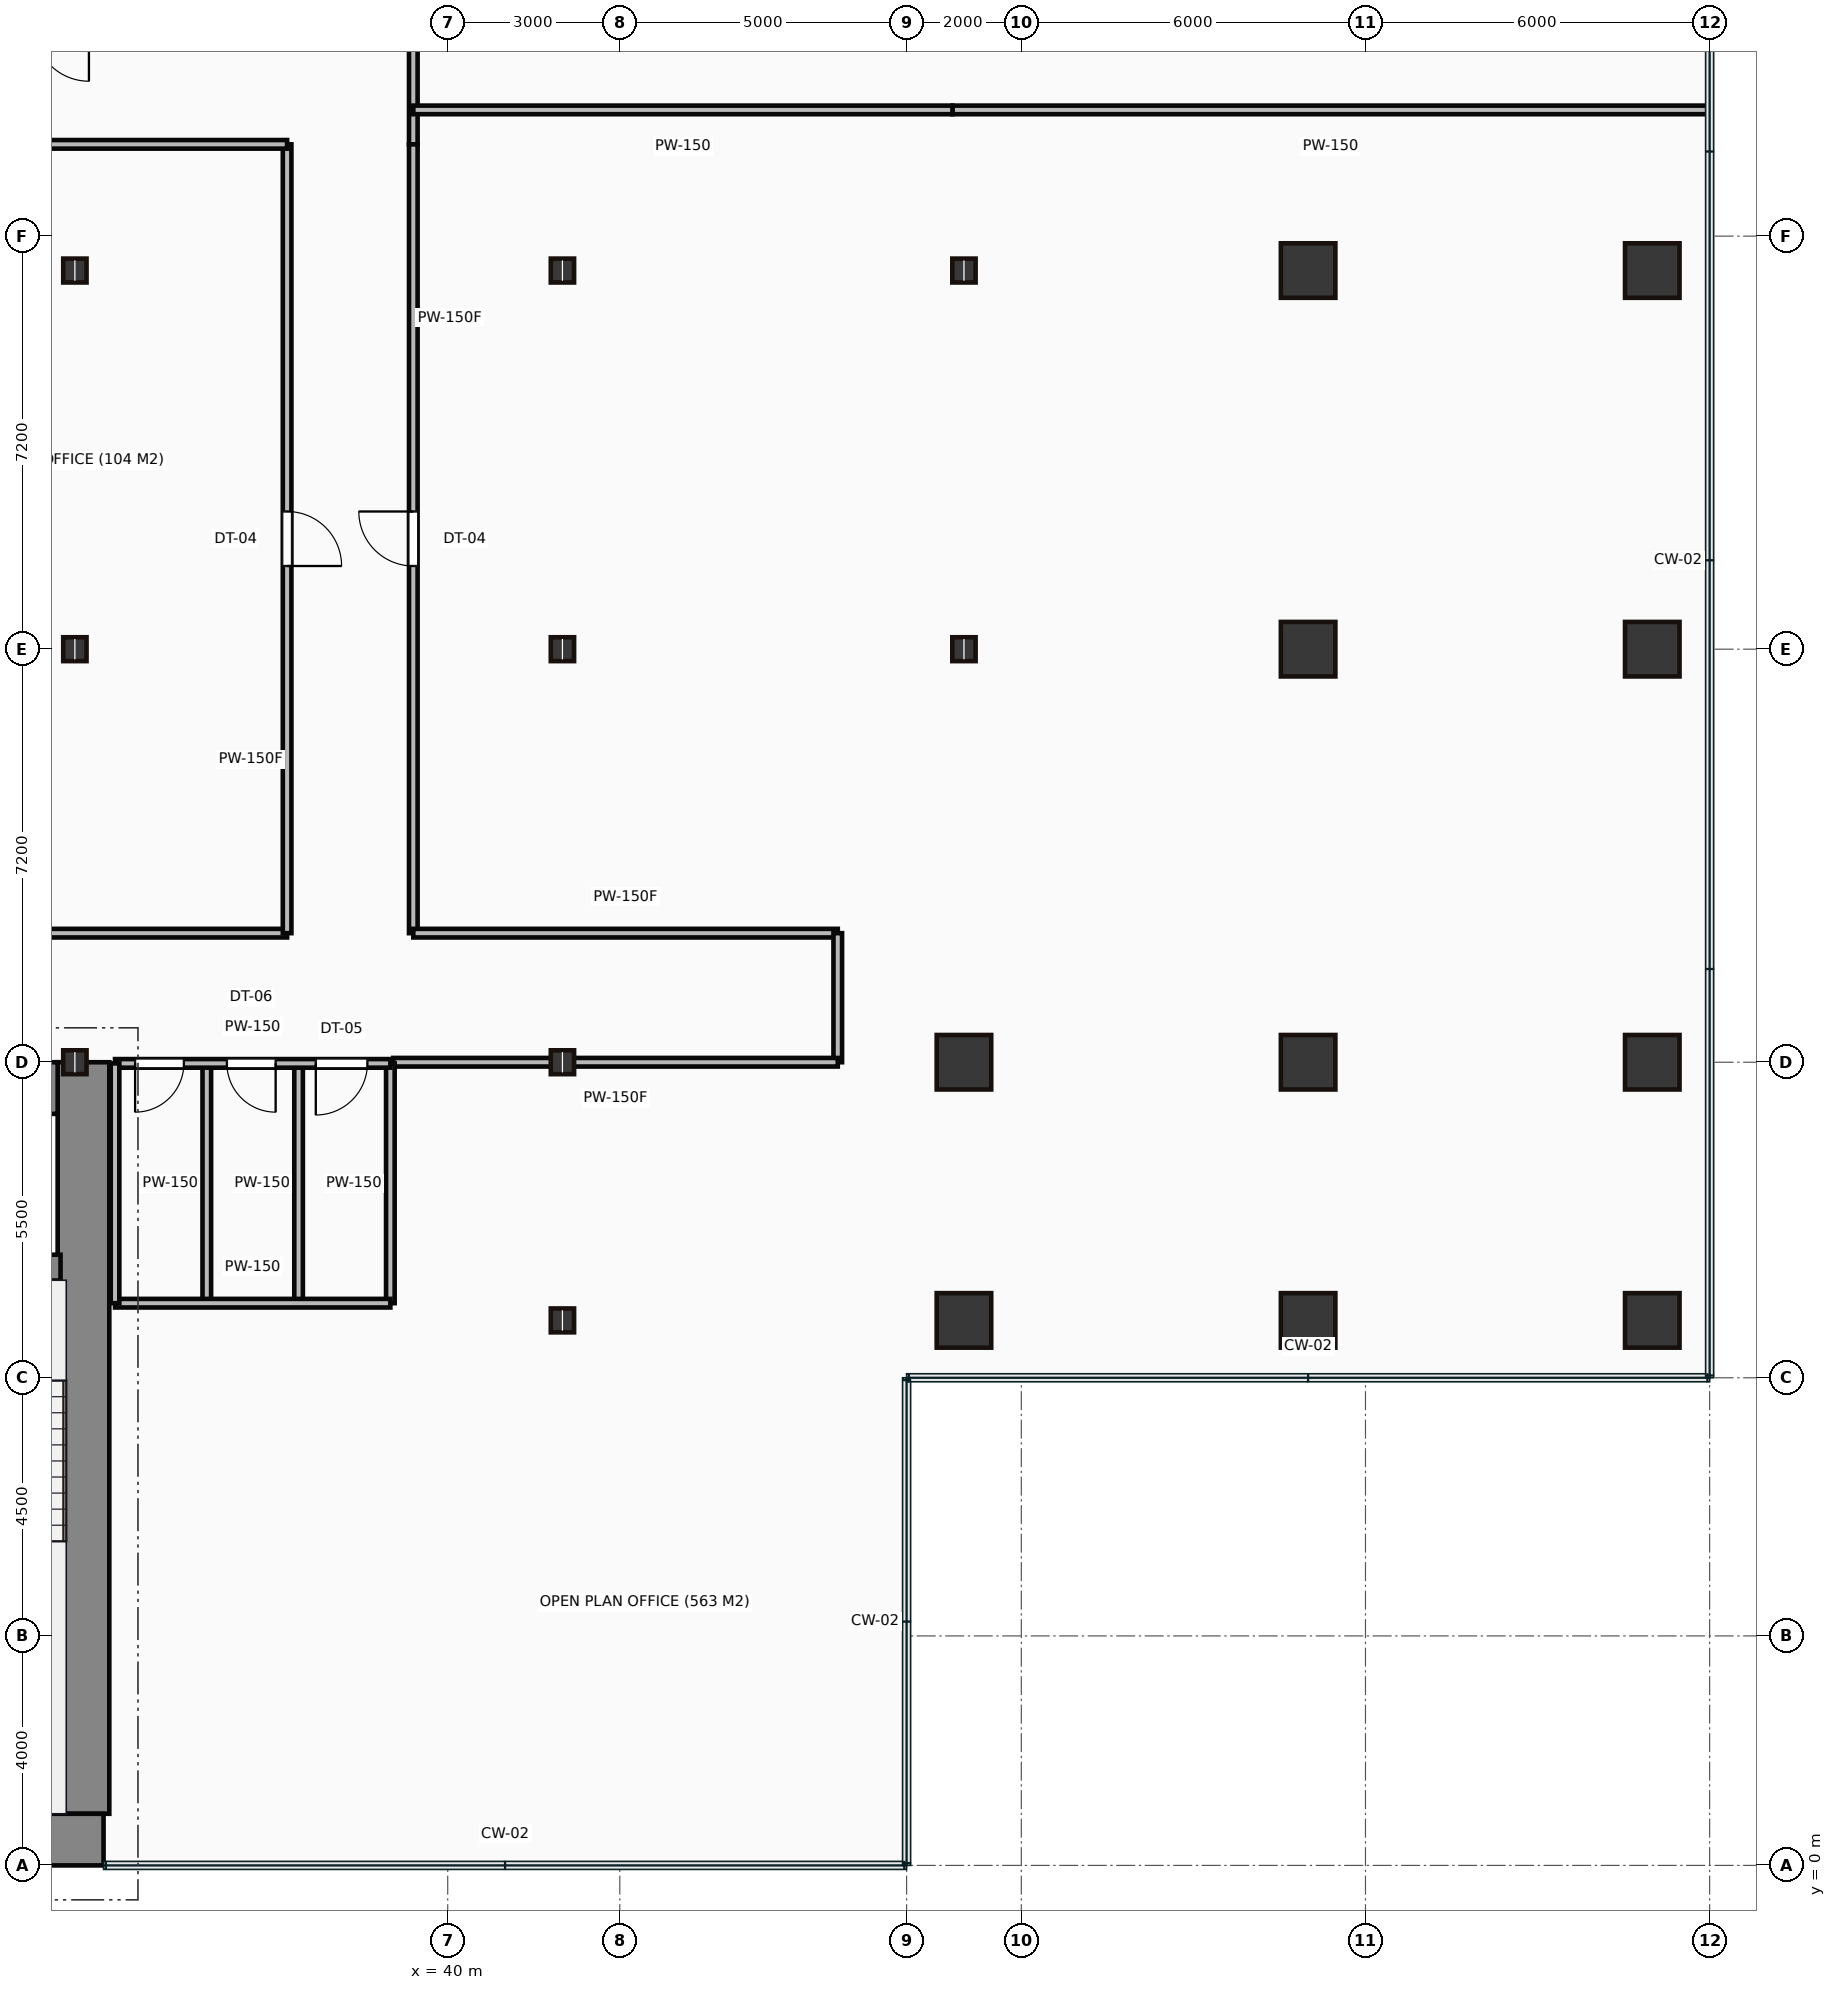
"""IFC4 building model, lengths in metres.
Left out: names, types, materials, properties, quantities, classifications, styles, units other than length and angle.
Written with IfcOpenShell. Run it as: python <this file> out.ifc"""

import sys

from ifc_helpers import new_model, si_unit, direction, frame, frame_2d, origin, origin_2d, place, context, subcontext, project, spatial, rectangle, hollow_rectangle, i_section, extrude, source, transform, mapped, element, fill, save


model = new_model("IFC4")
c1 = context("Model", 3, precision=1e-05, world=origin(), true_north=direction((0.0, 1.0)))
c2 = subcontext(c1, "Body", "Model", "MODEL_VIEW")
j1 = project(units=[si_unit("LENGTHUNIT", "METRE"), si_unit("PLANEANGLEUNIT", "RADIAN")], contexts=[c1])
p1 = place(None, origin())
s1 = spatial("IfcSite", under=j1, at=p1, CompositionType="ELEMENT")
p2 = place(p1, origin())
s2 = spatial("IfcBuilding", under=s1, at=p2, CompositionType="ELEMENT")
p3 = place(p2, frame((0.0, 0.0, 47.1)))
s3 = spatial("IfcBuildingStorey", under=s2, at=p3, CompositionType="ELEMENT", Elevation=47.1)
m1 = source(origin(), c2, "Body", "SweptSolid", [
    extrude(rectangle(XDim=29.5, YDim=0.9, at=frame_2d((14.75, 0.0))), origin(), (0.0, 0.0, 1.0), 3.65),
])
p4 = place(p3, frame((4.5, 0.45, 0.0), z_axis=(0.0, 0.0, 1.0), x_axis=(1.0, 0.0, 0.0)))
e1 = element("IfcWall", 1, at=p4, inside=s3, PredefinedType="SHEAR", context=c2, shape_type="MappedRepresentation", body=[
    mapped(m1, transform((0.0, 0.0, 0.0))),
])
m2 = source(origin(), c2, "Body", "SweptSolid", [
    extrude(rectangle(XDim=13.1, YDim=0.9, at=frame_2d((6.55, 0.0))), origin(), (0.0, 0.0, 1.0), 3.65),
])
p5 = place(p3, frame((33.65, 0.9, 0.0), z_axis=(0.0, 0.0, 1.0), x_axis=(0.0, 1.0, 0.0)))
e2 = element("IfcWall", 2, at=p5, inside=s3, PredefinedType="SHEAR", context=c2, shape_type="MappedRepresentation", body=[
    mapped(m2, transform((0.0, 0.0, 0.0))),
])
m3 = source(origin(), c2, "Body", "SweptSolid", [
    extrude(rectangle(XDim=12.6, YDim=0.9, at=frame_2d((6.3, 0.0))), origin(), (0.0, 0.0, 1.0), 3.65),
])
p6 = place(p3, frame((20.6, 13.55, 0.0), z_axis=(0.0, 0.0, 1.0), x_axis=(1.0, 0.0, 0.0)))
e3 = element("IfcWall", 3, at=p6, inside=s3, PredefinedType="SHEAR", context=c2, shape_type="MappedRepresentation", body=[
    mapped(m3, transform((0.0, 0.0, 0.0))),
])
p7 = place(p6, frame((9.25, 0.0, 0.0)))
e4 = element("IfcOpeningElement", 4, at=p7, cuts=e3, PredefinedType="OPENING", context=c2, shape_type="SweptSolid", body=[
    extrude(rectangle(XDim=1.1, YDim=2.15, at=frame_2d((0.55, 1.075))), frame((0.0, 0.46, 0.0), z_axis=(0.0, -1.0, 0.0), x_axis=(1.0, 0.0, 0.0)), (0.0, 0.0, 1.0), 0.92),
])
m4 = source(origin(), c2, "Body", "SweptSolid", [
    extrude(rectangle(XDim=3.39, YDim=0.45, at=frame_2d((1.695, 0.0))), origin(), (0.0, 0.0, 1.0), 3.65),
])
p8 = place(p3, frame((29.86, 10.42, 0.0), z_axis=(0.0, 0.0, 1.0), x_axis=(1.0, 0.0, 0.0)))
e5 = element("IfcWall", 5, at=p8, inside=s3, PredefinedType="SHEAR", context=c2, shape_type="MappedRepresentation", body=[
    mapped(m4, transform((0.0, 0.0, 0.0))),
])
p9 = place(p8, frame((1.1, 0.0, 0.0)))
e6 = element("IfcOpeningElement", 6, at=p9, cuts=e5, PredefinedType="OPENING", context=c2, shape_type="SweptSolid", body=[
    extrude(rectangle(XDim=1.1, YDim=2.15, at=frame_2d((0.55, 1.075))), frame((0.0, 0.235, 0.0), z_axis=(0.0, -1.0, 0.0), x_axis=(1.0, 0.0, 0.0)), (0.0, 0.0, 1.0), 0.47),
])
m5 = source(origin(), c2, "Body", "SweptSolid", [
    extrude(i_section(OverallWidth=0.406, OverallDepth=0.416, WebThickness=0.03, FlangeThickness=0.048, at=origin_2d()), origin(), (0.0, 0.0, 1.0), 3.65),
])
for number, where, z_axis, x_axis in (
    (7, (33.5, 14.0, 0.0), (0.0, 0.0, 1.0), (1.0, 0.0, 0.0)),
    (8, (33.5, 21.2, 0.0), (0.0, 0.0, 1.0), (1.0, 0.0, 0.0)),
    (9, (33.5, 27.8, 0.0), (0.0, 0.0, 1.0), (1.0, 0.0, 0.0)),
    (10, (42.0, 9.5, 0.0), (0.0, 0.0, 1.0), (1.0, 0.0, 0.0)),
    (11, (42.0, 14.0, 0.0), (0.0, 0.0, 1.0), (1.0, 0.0, 0.0)),
    (12, (42.0, 21.2, 0.0), (0.0, 0.0, 1.0), (1.0, 0.0, 0.0)),
    (13, (42.0, 27.8, 0.0), (0.0, 0.0, 1.0), (1.0, 0.0, 0.0)),
):
    element("IfcColumn", number, at=place(p3, frame(where, z_axis=z_axis, x_axis=x_axis)), inside=s3, PredefinedType="COLUMN", context=c2, shape_type="MappedRepresentation", body=[
        mapped(m5, transform((0.0, 0.0, 0.0))),
    ])
m6 = source(origin(), c2, "Body", "SweptSolid", [
    extrude(hollow_rectangle(XDim=0.95, YDim=0.95, WallThickness=0.045, at=origin_2d()), origin(), (0.0, 0.0, 1.0), 3.65),
])
for number, where, z_axis, x_axis in (
    (14, (49.0, 9.5, 0.0), (0.0, 0.0, 1.0), (1.0, 0.0, 0.0)),
    (15, (49.0, 14.0, 0.0), (0.0, 0.0, 1.0), (1.0, 0.0, 0.0)),
):
    element("IfcColumn", number, at=place(p3, frame(where, z_axis=z_axis, x_axis=x_axis)), inside=s3, PredefinedType="COLUMN", context=c2, shape_type="MappedRepresentation", body=[
        mapped(m6, transform((0.0, 0.0, 0.0))),
    ])
for number, where, z_axis, x_axis in (
    (16, (49.0, 21.2, 0.0), (0.0, 0.0, 1.0), (1.0, 0.0, 0.0)),
    (17, (49.0, 27.8, 0.0), (0.0, 0.0, 1.0), (1.0, 0.0, 0.0)),
):
    element("IfcColumn", number, at=place(p3, frame(where, z_axis=z_axis, x_axis=x_axis)), inside=s3, PredefinedType="COLUMN", context=c2, shape_type="MappedRepresentation", body=[
        mapped(m5, transform((0.0, 0.0, 0.0))),
    ])
for number, where, z_axis, x_axis in (
    (18, (55.0, 9.5, 0.0), (0.0, 0.0, 1.0), (1.0, 0.0, 0.0)),
    (19, (55.0, 14.0, 0.0), (0.0, 0.0, 1.0), (1.0, 0.0, 0.0)),
    (20, (55.0, 21.2, 0.0), (0.0, 0.0, 1.0), (1.0, 0.0, 0.0)),
    (21, (55.0, 27.8, 0.0), (0.0, 0.0, 1.0), (1.0, 0.0, 0.0)),
    (22, (61.0, 9.5, 0.0), (0.0, 0.0, 1.0), (1.0, 0.0, 0.0)),
    (23, (61.0, 14.0, 0.0), (0.0, 0.0, 1.0), (1.0, 0.0, 0.0)),
    (24, (61.0, 21.2, 0.0), (0.0, 0.0, 1.0), (1.0, 0.0, 0.0)),
    (25, (61.0, 27.8, 0.0), (0.0, 0.0, 1.0), (1.0, 0.0, 0.0)),
):
    element("IfcColumn", number, at=place(p3, frame(where, z_axis=z_axis, x_axis=x_axis)), inside=s3, PredefinedType="COLUMN", context=c2, shape_type="MappedRepresentation", body=[
        mapped(m6, transform((0.0, 0.0, 0.0))),
    ])
m7 = source(origin(), c2, "Body", "SweptSolid", [
    extrude(rectangle(XDim=4.8, YDim=0.15, at=frame_2d((2.4, 0.0))), origin(), (0.0, 0.0, 1.0), 2.625),
])
p10 = place(p3, frame((34.2, 13.98, 0.0), z_axis=(0.0, 0.0, 1.0), x_axis=(1.0, 0.0, 0.0)))
e26 = element("IfcWall", 26, at=p10, inside=s3, PredefinedType="PARTITIONING", context=c2, shape_type="MappedRepresentation", body=[
    mapped(m7, transform((0.0, 0.0, 0.0))),
])
p11 = place(p10, frame((0.35, 0.0, 0.0)))
e27 = element("IfcOpeningElement", 27, at=p11, cuts=e26, PredefinedType="OPENING", context=c2, shape_type="SweptSolid", body=[
    extrude(rectangle(XDim=0.85, YDim=2.1, at=frame_2d((0.425, 1.05))), frame((0.0, 0.085, 0.0), z_axis=(0.0, -1.0, 0.0), x_axis=(1.0, 0.0, 0.0)), (0.0, 0.0, 1.0), 0.17),
])
p12 = place(p10, frame((1.95, 0.0, 0.0)))
e28 = element("IfcOpeningElement", 28, at=p12, cuts=e26, PredefinedType="OPENING", context=c2, shape_type="SweptSolid", body=[
    extrude(rectangle(XDim=0.85, YDim=2.1, at=frame_2d((0.425, 1.05))), frame((0.0, 0.085, 0.0), z_axis=(0.0, -1.0, 0.0), x_axis=(1.0, 0.0, 0.0)), (0.0, 0.0, 1.0), 0.17),
])
p13 = place(p10, frame((3.5, 0.0, 0.0)))
e29 = element("IfcOpeningElement", 29, at=p13, cuts=e26, PredefinedType="OPENING", context=c2, shape_type="SweptSolid", body=[
    extrude(rectangle(XDim=0.9, YDim=2.1, at=frame_2d((0.45, 1.05))), frame((0.0, 0.085, 0.0), z_axis=(0.0, -1.0, 0.0), x_axis=(1.0, 0.0, 0.0)), (0.0, 0.0, 1.0), 0.17),
])
m8 = source(origin(), c2, "Body", "SweptSolid", [
    extrude(rectangle(XDim=4.8, YDim=0.15, at=frame_2d((2.4, 0.0))), origin(), (0.0, 0.0, 1.0), 3.4),
])
p14 = place(p3, frame((34.2, 9.8, 0.0), z_axis=(0.0, 0.0, 1.0), x_axis=(1.0, 0.0, 0.0)))
e30 = element("IfcWall", 30, at=p14, inside=s3, PredefinedType="PARTITIONING", context=c2, shape_type="MappedRepresentation", body=[
    mapped(m8, transform((0.0, 0.0, 0.0))),
])
m9 = source(origin(), c2, "Body", "SweptSolid", [
    extrude(rectangle(XDim=4.18, YDim=0.15, at=frame_2d((2.09, 0.0))), origin(), (0.0, 0.0, 1.0), 3.4),
])
for number, where, z_axis, x_axis in (
    (31, (39.0, 9.8, 0.0), (0.0, 0.0, 1.0), (0.0, 1.0, 0.0)),
    (32, (34.2, 9.8, 0.0), (0.0, 0.0, 1.0), (0.0, 1.0, 0.0)),
    (33, (35.8, 9.8, 0.0), (0.0, 0.0, 1.0), (0.0, 1.0, 0.0)),
    (34, (37.4, 9.8, 0.0), (0.0, 0.0, 1.0), (0.0, 1.0, 0.0)),
):
    element("IfcWall", number, at=place(p3, frame(where, z_axis=z_axis, x_axis=x_axis)), inside=s3, PredefinedType="PARTITIONING", context=c2, shape_type="MappedRepresentation", body=[
        mapped(m9, transform((0.0, 0.0, 0.0))),
    ])
m10 = source(origin(), c2, "Body", "SweptSolid", [
    extrude(rectangle(XDim=2.05, YDim=0.15, at=frame_2d((1.025, 0.0))), origin(), (0.0, 0.0, 1.0), 3.4),
])
p15 = place(p3, frame((39.4, 32.05, 0.0), z_axis=(0.0, 0.0, 1.0), x_axis=(0.0, -1.0, 0.0)))
e35 = element("IfcWall", 35, at=p15, inside=s3, PredefinedType="PARTITIONING", context=c2, shape_type="MappedRepresentation", body=[
    mapped(m10, transform((0.0, 0.0, 0.0))),
])
m11 = source(origin(), c2, "Body", "SweptSolid", [
    extrude(rectangle(XDim=13.75, YDim=0.15, at=frame_2d((6.875, 0.0))), origin(), (0.0, 0.0, 1.0), 3.4),
])
p16 = place(p3, frame((39.4, 30.0, 0.0), z_axis=(0.0, 0.0, 1.0), x_axis=(0.0, -1.0, 0.0)))
e36 = element("IfcWall", 36, at=p16, inside=s3, PredefinedType="PARTITIONING", context=c2, shape_type="MappedRepresentation", body=[
    mapped(m11, transform((0.0, 0.0, 0.0))),
])
p17 = place(p16, frame((6.4, 0.0, 0.0)))
e37 = element("IfcOpeningElement", 37, at=p17, cuts=e36, PredefinedType="OPENING", context=c2, shape_type="SweptSolid", body=[
    extrude(rectangle(XDim=0.95, YDim=2.15, at=frame_2d((0.475, 1.075))), frame((0.0, 0.085, 0.0), z_axis=(0.0, -1.0, 0.0), x_axis=(1.0, 0.0, 0.0)), (0.0, 0.0, 1.0), 0.17),
])
m12 = source(origin(), c2, "Body", "SweptSolid", [
    extrude(rectangle(XDim=7.4, YDim=0.15, at=frame_2d((3.7, 0.0))), origin(), (0.0, 0.0, 1.0), 3.4),
])
p18 = place(p3, frame((39.4, 16.25, 0.0), z_axis=(0.0, 0.0, 1.0), x_axis=(1.0, 0.0, 0.0)))
e38 = element("IfcWall", 38, at=p18, inside=s3, PredefinedType="PARTITIONING", context=c2, shape_type="MappedRepresentation", body=[
    mapped(m12, transform((0.0, 0.0, 0.0))),
])
m13 = source(origin(), c2, "Body", "SweptSolid", [
    extrude(rectangle(XDim=2.25, YDim=0.15, at=frame_2d((1.125, 0.0))), origin(), (0.0, 0.0, 1.0), 3.4),
])
p19 = place(p3, frame((46.8, 16.25, 0.0), z_axis=(0.0, 0.0, 1.0), x_axis=(0.0, -1.0, 0.0)))
e39 = element("IfcWall", 39, at=p19, inside=s3, PredefinedType="PARTITIONING", context=c2, shape_type="MappedRepresentation", body=[
    mapped(m13, transform((0.0, 0.0, 0.0))),
])
m14 = source(origin(), c2, "Body", "SweptSolid", [
    extrude(rectangle(XDim=7.75, YDim=0.15, at=frame_2d((3.875, 0.0))), origin(), (0.0, 0.0, 1.0), 2.625),
])
p20 = place(p3, frame((46.8, 14.0, 0.0), z_axis=(0.0, 0.0, 1.0), x_axis=(-1.0, 0.0, 0.0)))
e40 = element("IfcWall", 40, at=p20, inside=s3, PredefinedType="PARTITIONING", context=c2, shape_type="MappedRepresentation", body=[
    mapped(m14, transform((0.0, 0.0, 0.0))),
])
m15 = source(origin(), c2, "Body", "SweptSolid", [
    extrude(rectangle(XDim=31.6, YDim=0.15, at=frame_2d((15.8, 0.0))), origin(), (0.0, 0.0, 1.0), 3.4),
])
p21 = place(p3, frame((5.6, 16.25, 0.0), z_axis=(0.0, 0.0, 1.0), x_axis=(1.0, 0.0, 0.0)))
e41 = element("IfcWall", 41, at=p21, inside=s3, PredefinedType="PARTITIONING", context=c2, shape_type="MappedRepresentation", body=[
    mapped(m15, transform((0.0, 0.0, 0.0))),
])
p22 = place(p21, frame((10.125, 0.0, 0.0)))
e42 = element("IfcOpeningElement", 42, at=p22, cuts=e41, PredefinedType="OPENING", context=c2, shape_type="SweptSolid", body=[
    extrude(rectangle(XDim=0.95, YDim=2.15, at=frame_2d((0.475, 1.075))), frame((0.0, 0.085, 0.0), z_axis=(0.0, -1.0, 0.0), x_axis=(1.0, 0.0, 0.0)), (0.0, 0.0, 1.0), 0.17),
])
p23 = place(p21, frame((18.925, 0.0, 0.0)))
e43 = element("IfcOpeningElement", 43, at=p23, cuts=e41, PredefinedType="OPENING", context=c2, shape_type="SweptSolid", body=[
    extrude(rectangle(XDim=0.95, YDim=2.15, at=frame_2d((0.475, 1.075))), frame((0.0, 0.085, 0.0), z_axis=(0.0, -1.0, 0.0), x_axis=(1.0, 0.0, 0.0)), (0.0, 0.0, 1.0), 0.17),
])
p24 = place(p3, frame((37.2, 16.25, 0.0), z_axis=(0.0, 0.0, 1.0), x_axis=(0.0, 1.0, 0.0)))
e44 = element("IfcWall", 44, at=p24, inside=s3, PredefinedType="PARTITIONING", context=c2, shape_type="MappedRepresentation", body=[
    mapped(m11, transform((0.0, 0.0, 0.0))),
])
p25 = place(p24, frame((6.4, 0.0, 0.0)))
e45 = element("IfcOpeningElement", 45, at=p25, cuts=e44, PredefinedType="OPENING", context=c2, shape_type="SweptSolid", body=[
    extrude(rectangle(XDim=0.95, YDim=2.15, at=frame_2d((0.475, 1.075))), frame((0.0, 0.085, 0.0), z_axis=(0.0, -1.0, 0.0), x_axis=(1.0, 0.0, 0.0)), (0.0, 0.0, 1.0), 0.17),
])
m16 = source(origin(), c2, "Body", "SweptSolid", [
    extrude(rectangle(XDim=31.6, YDim=0.15, at=frame_2d((15.8, 0.0))), origin(), (0.0, 0.0, 1.0), 2.978),
])
p26 = place(p3, frame((37.2, 30.0, 0.0), z_axis=(0.0, 0.0, 1.0), x_axis=(-1.0, 0.0, 0.0)))
e46 = element("IfcWall", 46, at=p26, inside=s3, PredefinedType="PARTITIONING", context=c2, shape_type="MappedRepresentation", body=[
    mapped(m16, transform((0.0, 0.0, 0.0))),
])
m17 = source(origin(), c2, "Body", "SweptSolid", [
    extrude(rectangle(XDim=13.18, YDim=0.15, at=frame_2d((6.59, 0.0))), origin(), (0.0, 0.0, 1.0), 3.4),
])
p27 = place(p3, frame((61.98, 30.6, 0.0), z_axis=(0.0, 0.0, 1.0), x_axis=(-1.0, 0.0, 0.0)))
e47 = element("IfcWall", 47, at=p27, inside=s3, PredefinedType="PARTITIONING", context=c2, shape_type="MappedRepresentation", body=[
    mapped(m17, transform((0.0, 0.0, 0.0))),
])
m18 = source(origin(), c2, "Body", "SweptSolid", [
    extrude(rectangle(XDim=9.4, YDim=0.15, at=frame_2d((4.7, 0.0))), origin(), (0.0, 0.0, 1.0), 3.4),
])
p28 = place(p3, frame((48.8, 30.6, 0.0), z_axis=(0.0, 0.0, 1.0), x_axis=(-1.0, 0.0, 0.0)))
e48 = element("IfcWall", 48, at=p28, inside=s3, PredefinedType="PARTITIONING", context=c2, shape_type="MappedRepresentation", body=[
    mapped(m18, transform((0.0, 0.0, 0.0))),
])
m19 = source(origin(), c2, "Body", "SweptSolid", [
    extrude(rectangle(XDim=0.85, YDim=2.1, at=frame_2d((0.425, 1.05))), frame((0.0, 0.025, 0.0), z_axis=(0.0, -1.0, 0.0), x_axis=(1.0, 0.0, 0.0)), (0.0, 0.0, 1.0), 0.05),
])
p29 = place(p11, frame((0.85, 0.0, 0.0), z_axis=(0.0, 0.0, 1.0), x_axis=(-1.0, 0.0, 0.0)))
e49 = element("IfcDoor", 49, at=p29, inside=s3, OperationType="SINGLE_SWING_LEFT", PredefinedType="DOOR", context=c2, shape_type="MappedRepresentation", body=[
    mapped(m19, transform((0.0, 0.0, 0.0))),
])
fill(e27, e49)
p30 = place(p12, frame((0.85, 0.0, 0.0), z_axis=(0.0, 0.0, 1.0), x_axis=(-1.0, 0.0, 0.0)))
e50 = element("IfcDoor", 50, at=p30, inside=s3, OperationType="SINGLE_SWING_RIGHT", PredefinedType="DOOR", context=c2, shape_type="MappedRepresentation", body=[
    mapped(m19, transform((0.0, 0.0, 0.0))),
])
fill(e28, e50)
m20 = source(origin(), c2, "Body", "SweptSolid", [
    extrude(rectangle(XDim=0.9, YDim=2.1, at=frame_2d((0.45, 1.05))), frame((0.0, 0.025, 0.0), z_axis=(0.0, -1.0, 0.0), x_axis=(1.0, 0.0, 0.0)), (0.0, 0.0, 1.0), 0.05),
])
p31 = place(p13, frame((0.9, 0.0, 0.0), z_axis=(0.0, 0.0, 1.0), x_axis=(-1.0, 0.0, 0.0)))
e51 = element("IfcDoor", 51, at=p31, inside=s3, OperationType="SINGLE_SWING_LEFT", PredefinedType="DOOR", context=c2, shape_type="MappedRepresentation", body=[
    mapped(m20, transform((0.0, 0.0, 0.0))),
])
fill(e29, e51)
m21 = source(origin(), c2, "Body", "SweptSolid", [
    extrude(rectangle(XDim=0.95, YDim=2.15, at=frame_2d((0.475, 1.075))), frame((0.0, 0.025, 0.0), z_axis=(0.0, -1.0, 0.0), x_axis=(1.0, 0.0, 0.0)), (0.0, 0.0, 1.0), 0.05),
])
p32 = place(p25, origin())
e52 = element("IfcDoor", 52, at=p32, inside=s3, OperationType="SINGLE_SWING_LEFT", PredefinedType="DOOR", context=c2, shape_type="MappedRepresentation", body=[
    mapped(m21, transform((0.0, 0.0, 0.0))),
])
fill(e45, e52)
p33 = place(p17, origin())
e53 = element("IfcDoor", 53, at=p33, inside=s3, OperationType="SINGLE_SWING_LEFT", PredefinedType="DOOR", context=c2, shape_type="MappedRepresentation", body=[
    mapped(m21, transform((0.0, 0.0, 0.0))),
])
fill(e37, e53)
save(model, sys.argv[1])
